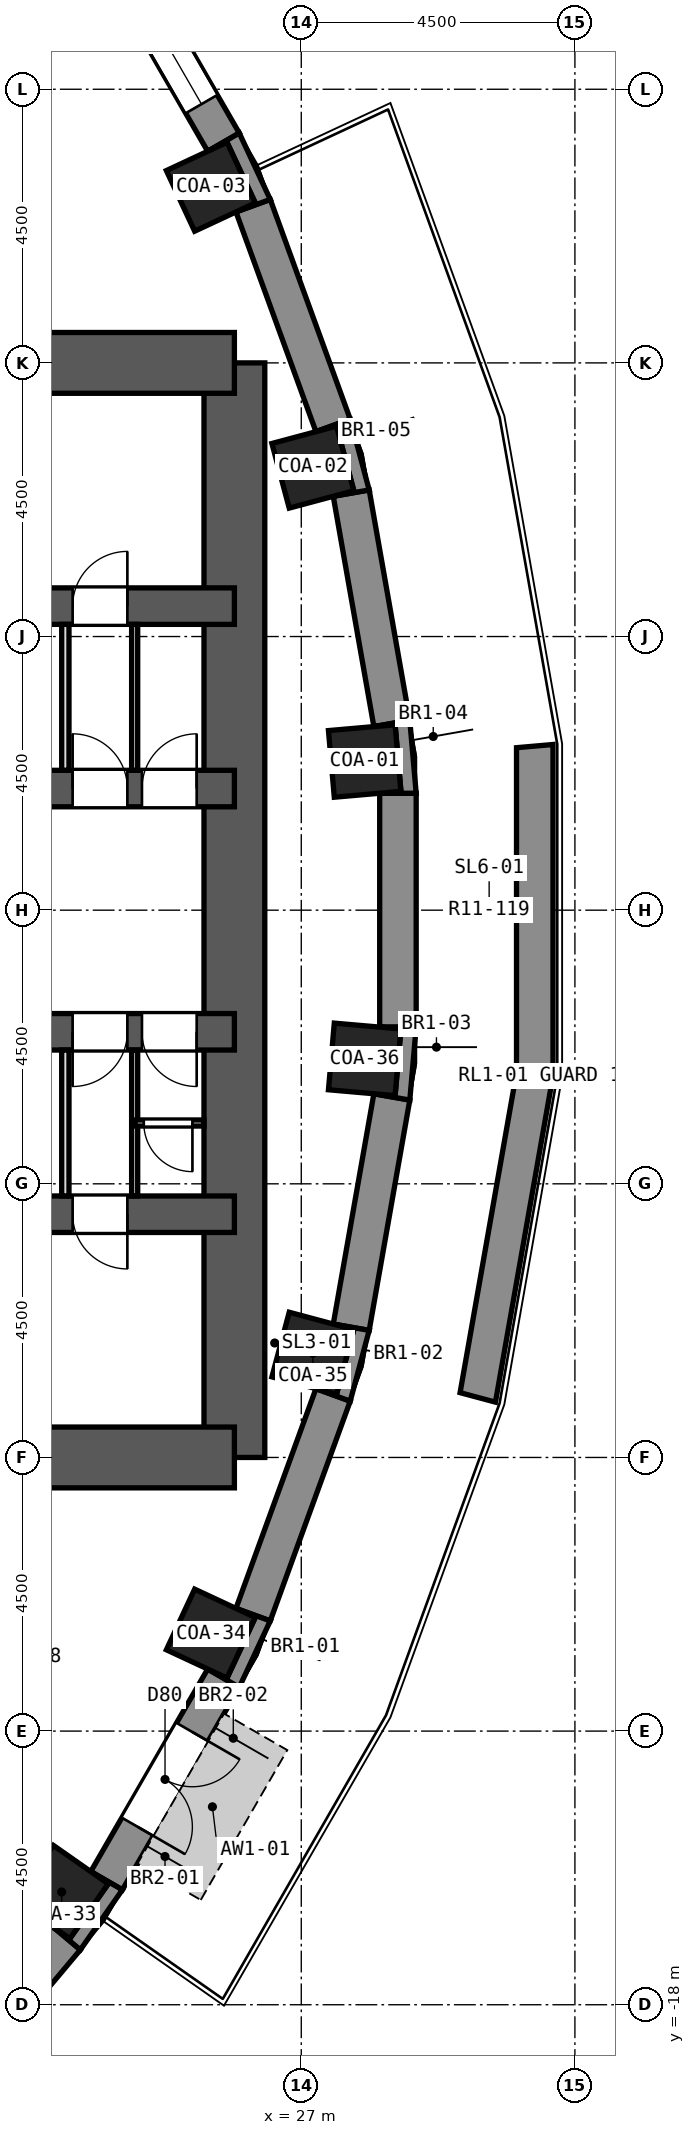
"""IFC4 building model, lengths in metres.
Left out: names, types, materials, properties, quantities, classifications, styles, units other than length and angle.
Written with IfcOpenShell. Run it as: python <this file> out.ifc"""

import sys

from ifc_helpers import new_model, si_unit, direction, frame, frame_2d, origin, origin_2d, place, context, subcontext, project, spatial, polyline, rectangle, outline, extrude, element, fill, save


model = new_model("IFC4")
c1 = context("Model", 3, precision=1e-05, world=origin(), true_north=direction((0.0, 1.0)))
c2 = subcontext(c1, "Body", "Model", "MODEL_VIEW")
j1 = project(units=[si_unit("LENGTHUNIT", "METRE"), si_unit("PLANEANGLEUNIT", "RADIAN")], contexts=[c1])
p1 = place(None, origin())
s1 = spatial("IfcSite", under=j1, at=p1, CompositionType="ELEMENT")
p2 = place(p1, origin())
s2 = spatial("IfcBuilding", under=s1, at=p2, CompositionType="ELEMENT")
p3 = place(p2, frame((0.0, 0.0, 46.1)))
s3 = spatial("IfcBuildingStorey", under=s2, at=p3, CompositionType="ELEMENT", Elevation=46.1)
for number, where, z_axis, x_axis in (
    (1, (28.043, 2.453, 0.0), (0.0, 0.0, 1.0), (0.996, 0.087, 0.0)),
    (2, (27.191, 7.286, 0.0), (0.0, 0.0, 1.0), (0.966, 0.259, 0.0)),
    (3, (25.512, 11.897, 0.0), (0.0, 0.0, 1.0), (0.906, 0.423, 0.0)),
    (4, (23.059, -16.146, 0.0), (0.0, 0.0, 1.0), (0.819, -0.574, 0.0)),
    (5, (25.512, -11.897, 0.0), (0.0, 0.0, 1.0), (0.906, -0.423, 0.0)),
    (6, (27.191, -7.286, 0.0), (0.0, 0.0, 1.0), (0.966, -0.259, 0.0)),
    (7, (28.043, -2.453, 0.0), (0.0, 0.0, 1.0), (0.996, -0.087, 0.0)),
):
    element("IfcColumn", number, at=place(p3, frame(where, z_axis=z_axis, x_axis=x_axis)), inside=s3, PredefinedType="COLUMN", context=c2, shape_type="SweptSolid", body=[
        extrude(rectangle(XDim=1.1, YDim=1.1, at=origin_2d()), origin(), (0.0, 0.0, 1.0), 3.3),
    ])
p4 = place(p3, frame((25.9, -9.0, 0.0), z_axis=(0.0, 0.0, 1.0), x_axis=(0.0, 1.0, 0.0)))
e8 = element("IfcWall", 8, at=p4, inside=s3, PredefinedType="SHEAR", context=c2, shape_type="SweptSolid", body=[
    extrude(rectangle(XDim=18.0, YDim=1.0, at=frame_2d((9.0, 0.0))), origin(), (0.0, 0.0, 1.0), 3.3),
])
for number, where, z_axis, x_axis in (
    (9, (13.5, 9.0, 0.0), (0.0, 0.0, 1.0), (1.0, 0.0, 0.0)),
    (10, (13.5, -9.0, 0.0), (0.0, 0.0, 1.0), (1.0, 0.0, 0.0)),
):
    element("IfcWall", number, at=place(p3, frame(where, z_axis=z_axis, x_axis=x_axis)), inside=s3, PredefinedType="SHEAR", context=c2, shape_type="SweptSolid", body=[
        extrude(rectangle(XDim=12.4, YDim=1.0, at=frame_2d((6.2, 0.0))), origin(), (0.0, 0.0, 1.0), 3.3),
    ])
p5 = place(p3, frame((13.5, 5.0, 0.0), z_axis=(0.0, 0.0, 1.0), x_axis=(1.0, 0.0, 0.0)))
e11 = element("IfcWall", 11, at=p5, inside=s3, PredefinedType="SHEAR", context=c2, shape_type="SweptSolid", body=[
    extrude(rectangle(XDim=12.4, YDim=0.6, at=frame_2d((6.2, 0.0))), origin(), (0.0, 0.0, 1.0), 3.3),
])
p6 = place(p5, frame((6.039, 0.0, 0.0)))
e12 = element("IfcOpeningElement", 12, at=p6, cuts=e11, PredefinedType="OPENING", context=c2, shape_type="SweptSolid", body=[
    extrude(rectangle(XDim=0.9, YDim=2.1, at=frame_2d((0.45, 1.05))), frame((0.0, 0.312, 0.0), z_axis=(0.0, -1.0, 0.0), x_axis=(1.0, 0.0, 0.0)), (0.0, 0.0, 1.0), 0.624),
])
p7 = place(p5, frame((9.74, 0.0, 0.0)))
e13 = element("IfcOpeningElement", 13, at=p7, cuts=e11, PredefinedType="OPENING", context=c2, shape_type="SweptSolid", body=[
    extrude(rectangle(XDim=0.9, YDim=2.1, at=frame_2d((0.45, 1.05))), frame((0.0, 0.312, 0.0), z_axis=(0.0, -1.0, 0.0), x_axis=(1.0, 0.0, 0.0)), (0.0, 0.0, 1.0), 0.624),
])
p8 = place(p3, frame((13.5, -5.0, 0.0), z_axis=(0.0, 0.0, 1.0), x_axis=(1.0, 0.0, 0.0)))
e14 = element("IfcWall", 14, at=p8, inside=s3, PredefinedType="SHEAR", context=c2, shape_type="SweptSolid", body=[
    extrude(rectangle(XDim=12.4, YDim=0.6, at=frame_2d((6.2, 0.0))), origin(), (0.0, 0.0, 1.0), 3.3),
])
p9 = place(p8, frame((9.74, 0.0, 0.0)))
e15 = element("IfcOpeningElement", 15, at=p9, cuts=e14, PredefinedType="OPENING", context=c2, shape_type="SweptSolid", body=[
    extrude(rectangle(XDim=0.9, YDim=2.1, at=frame_2d((0.45, 1.05))), frame((0.0, 0.312, 0.0), z_axis=(0.0, -1.0, 0.0), x_axis=(1.0, 0.0, 0.0)), (0.0, 0.0, 1.0), 0.624),
])
p10 = place(p8, frame((0.6, 0.0, 0.0)))
e16 = element("IfcOpeningElement", 16, at=p10, cuts=e14, PredefinedType="OPENING", context=c2, shape_type="SweptSolid", body=[
    extrude(rectangle(XDim=1.1, YDim=2.1, at=frame_2d((0.55, 1.05))), frame((0.0, 0.312, 0.0), z_axis=(0.0, -1.0, 0.0), x_axis=(1.0, 0.0, 0.0)), (0.0, 0.0, 1.0), 0.624),
])
p11 = place(p3, frame((13.5, 2.0, 0.0), z_axis=(0.0, 0.0, 1.0), x_axis=(1.0, 0.0, 0.0)))
e17 = element("IfcWall", 17, at=p11, inside=s3, PredefinedType="SHEAR", context=c2, shape_type="SweptSolid", body=[
    extrude(rectangle(XDim=12.4, YDim=0.6, at=frame_2d((6.2, 0.0))), origin(), (0.0, 0.0, 1.0), 3.3),
])
p12 = place(p11, frame((7.65, 0.0, 0.0)))
e18 = element("IfcOpeningElement", 18, at=p12, cuts=e17, PredefinedType="OPENING", context=c2, shape_type="SweptSolid", body=[
    extrude(rectangle(XDim=1.1, YDim=2.1, at=frame_2d((0.55, 1.05))), frame((0.0, 0.312, 0.0), z_axis=(0.0, -1.0, 0.0), x_axis=(1.0, 0.0, 0.0)), (0.0, 0.0, 1.0), 0.624),
])
p13 = place(p11, frame((2.341, 0.0, 0.0)))
e19 = element("IfcOpeningElement", 19, at=p13, cuts=e17, PredefinedType="OPENING", context=c2, shape_type="SweptSolid", body=[
    extrude(rectangle(XDim=0.9, YDim=2.1, at=frame_2d((0.45, 1.05))), frame((0.0, 0.312, 0.0), z_axis=(0.0, -1.0, 0.0), x_axis=(1.0, 0.0, 0.0)), (0.0, 0.0, 1.0), 0.624),
])
p14 = place(p11, frame((5.761, 0.0, 0.0)))
e20 = element("IfcOpeningElement", 20, at=p14, cuts=e17, PredefinedType="OPENING", context=c2, shape_type="SweptSolid", body=[
    extrude(rectangle(XDim=0.9, YDim=2.1, at=frame_2d((0.45, 1.05))), frame((0.0, 0.312, 0.0), z_axis=(0.0, -1.0, 0.0), x_axis=(1.0, 0.0, 0.0)), (0.0, 0.0, 1.0), 0.624),
])
p15 = place(p11, frame((9.74, 0.0, 0.0)))
e21 = element("IfcOpeningElement", 21, at=p15, cuts=e17, PredefinedType="OPENING", context=c2, shape_type="SweptSolid", body=[
    extrude(rectangle(XDim=0.9, YDim=2.1, at=frame_2d((0.45, 1.05))), frame((0.0, 0.312, 0.0), z_axis=(0.0, -1.0, 0.0), x_axis=(1.0, 0.0, 0.0)), (0.0, 0.0, 1.0), 0.624),
])
p16 = place(p11, frame((10.88, 0.0, 0.0)))
e22 = element("IfcOpeningElement", 22, at=p16, cuts=e17, PredefinedType="OPENING", context=c2, shape_type="SweptSolid", body=[
    extrude(rectangle(XDim=0.9, YDim=2.1, at=frame_2d((0.45, 1.05))), frame((0.0, 0.312, 0.0), z_axis=(0.0, -1.0, 0.0), x_axis=(1.0, 0.0, 0.0)), (0.0, 0.0, 1.0), 0.624),
])
p17 = place(p3, frame((13.5, -2.0, 0.0), z_axis=(0.0, 0.0, 1.0), x_axis=(1.0, 0.0, 0.0)))
e23 = element("IfcWall", 23, at=p17, inside=s3, PredefinedType="SHEAR", context=c2, shape_type="SweptSolid", body=[
    extrude(rectangle(XDim=12.4, YDim=0.6, at=frame_2d((6.2, 0.0))), origin(), (0.0, 0.0, 1.0), 3.3),
])
p18 = place(p17, frame((5.62, 0.0, 0.0)))
e24 = element("IfcOpeningElement", 24, at=p18, cuts=e23, PredefinedType="OPENING", context=c2, shape_type="SweptSolid", body=[
    extrude(rectangle(XDim=1.1, YDim=2.1, at=frame_2d((0.55, 1.05))), frame((0.0, 0.312, 0.0), z_axis=(0.0, -1.0, 0.0), x_axis=(1.0, 0.0, 0.0)), (0.0, 0.0, 1.0), 0.624),
])
p19 = place(p17, frame((7.65, 0.0, 0.0)))
e25 = element("IfcOpeningElement", 25, at=p19, cuts=e23, PredefinedType="OPENING", context=c2, shape_type="SweptSolid", body=[
    extrude(rectangle(XDim=1.1, YDim=2.1, at=frame_2d((0.55, 1.05))), frame((0.0, 0.312, 0.0), z_axis=(0.0, -1.0, 0.0), x_axis=(1.0, 0.0, 0.0)), (0.0, 0.0, 1.0), 0.624),
])
p20 = place(p17, frame((1.265, 0.0, 0.0)))
e26 = element("IfcOpeningElement", 26, at=p20, cuts=e23, PredefinedType="OPENING", context=c2, shape_type="SweptSolid", body=[
    extrude(rectangle(XDim=1.0, YDim=2.1, at=frame_2d((0.5, 1.05))), frame((0.0, 0.312, 0.0), z_axis=(0.0, -1.0, 0.0), x_axis=(1.0, 0.0, 0.0)), (0.0, 0.0, 1.0), 0.624),
])
p21 = place(p17, frame((9.74, 0.0, 0.0)))
e27 = element("IfcOpeningElement", 27, at=p21, cuts=e23, PredefinedType="OPENING", context=c2, shape_type="SweptSolid", body=[
    extrude(rectangle(XDim=0.9, YDim=2.1, at=frame_2d((0.45, 1.05))), frame((0.0, 0.312, 0.0), z_axis=(0.0, -1.0, 0.0), x_axis=(1.0, 0.0, 0.0)), (0.0, 0.0, 1.0), 0.624),
])
p22 = place(p17, frame((10.88, 0.0, 0.0)))
e28 = element("IfcOpeningElement", 28, at=p22, cuts=e23, PredefinedType="OPENING", context=c2, shape_type="SweptSolid", body=[
    extrude(rectangle(XDim=0.9, YDim=2.1, at=frame_2d((0.45, 1.05))), frame((0.0, 0.312, 0.0), z_axis=(0.0, -1.0, 0.0), x_axis=(1.0, 0.0, 0.0)), (0.0, 0.0, 1.0), 0.624),
])
p23 = place(p3, frame((28.489, 3.071, 0.0), z_axis=(0.0, 0.0, 1.0), x_axis=(-0.173687553279, 0.984800809218, 0.0)))
e29 = element("IfcWall", 29, at=p23, inside=s3, PredefinedType="SOLIDWALL", context=c2, shape_type="SweptSolid", body=[
    extrude(rectangle(XDim=3.846, YDim=0.6, at=frame_2d((1.923, 0.0))), origin(), (0.0, 0.0, 1.0), 2.75),
])
p24 = place(p3, frame((27.523, 7.971, 0.0), z_axis=(0.0, 0.0, 1.0), x_axis=(-0.342028474173, 0.939689588564, 0.0)))
e30 = element("IfcWall", 30, at=p24, inside=s3, PredefinedType="SOLIDWALL", context=c2, shape_type="SweptSolid", body=[
    extrude(rectangle(XDim=3.846, YDim=0.6, at=frame_2d((1.923, 0.0))), origin(), (0.0, 0.0, 1.0), 2.75),
])
p25 = place(p3, frame((25.721, 12.63, 0.0), z_axis=(0.0, 0.0, 1.0), x_axis=(-0.499989888488, 0.86603124159, 0.0)))
e31 = element("IfcWall", 31, at=p25, inside=s3, PredefinedType="SOLIDWALL", context=c2, shape_type="SweptSolid", body=[
    extrude(rectangle(XDim=3.846, YDim=0.6, at=frame_2d((1.923, 0.0))), origin(), (0.0, 0.0, 1.0), 2.75),
])
p26 = place(p25, frame((0.723, 0.0, 0.9)))
e32 = element("IfcOpeningElement", 32, at=p26, cuts=e31, PredefinedType="OPENING", context=c2, shape_type="SweptSolid", body=[
    extrude(rectangle(XDim=2.4, YDim=1.8, at=frame_2d((1.2, 0.9))), frame((0.0, 0.312, 0.0), z_axis=(0.0, -1.0, 0.0), x_axis=(1.0, 0.0, 0.0)), (0.0, 0.0, 1.0), 0.624),
])
p27 = place(p3, frame((20.665, -19.85, 0.0), z_axis=(0.0, 0.0, 1.0), x_axis=(0.642809392687, 0.766026164483, 0.0)))
e33 = element("IfcWall", 33, at=p27, inside=s3, PredefinedType="SOLIDWALL", context=c2, shape_type="SweptSolid", body=[
    extrude(rectangle(XDim=3.846, YDim=0.6, at=frame_2d((1.923, 0.0))), origin(), (0.0, 0.0, 1.0), 2.75),
])
p28 = place(p27, frame((0.723, 0.0, 0.9)))
e34 = element("IfcOpeningElement", 34, at=p28, cuts=e33, PredefinedType="OPENING", context=c2, shape_type="SweptSolid", body=[
    extrude(rectangle(XDim=2.4, YDim=1.8, at=frame_2d((1.2, 0.9))), frame((0.0, 0.312, 0.0), z_axis=(0.0, -1.0, 0.0), x_axis=(1.0, 0.0, 0.0)), (0.0, 0.0, 1.0), 0.624),
])
p29 = place(p3, frame((23.798, -15.96, 0.0), z_axis=(0.0, 0.0, 1.0), x_axis=(0.499989888488, 0.86603124159, 0.0)))
e35 = element("IfcWall", 35, at=p29, inside=s3, PredefinedType="SOLIDWALL", context=c2, shape_type="SweptSolid", body=[
    extrude(rectangle(XDim=3.846, YDim=0.6, at=frame_2d((1.923, 0.0))), origin(), (0.0, 0.0, 1.0), 2.75),
])
p30 = place(p29, frame((1.023, 0.0, 0.0)))
e36 = element("IfcOpeningElement", 36, at=p30, cuts=e35, PredefinedType="OPENING", context=c2, shape_type="SweptSolid", body=[
    extrude(rectangle(XDim=1.8, YDim=2.4, at=frame_2d((0.9, 1.2))), frame((0.0, 0.312, 0.0), z_axis=(0.0, -1.0, 0.0), x_axis=(1.0, 0.0, 0.0)), (0.0, 0.0, 1.0), 0.624),
])
p31 = place(p3, frame((26.208, -11.585, 0.0), z_axis=(0.0, 0.0, 1.0), x_axis=(0.342028474173, 0.939689588564, 0.0)))
e37 = element("IfcWall", 37, at=p31, inside=s3, PredefinedType="SOLIDWALL", context=c2, shape_type="SweptSolid", body=[
    extrude(rectangle(XDim=3.846, YDim=0.6, at=frame_2d((1.923, 0.0))), origin(), (0.0, 0.0, 1.0), 2.75),
])
for number, where, z_axis, x_axis in (
    (38, (27.821, -6.858, 0.0), (0.0, 0.0, 1.0), (0.174, 0.985, 0.0)),
    (39, (28.59, -1.923, 0.0), (0.0, 0.0, 1.0), (0.0, 1.0, 0.0)),
):
    element("IfcWall", number, at=place(p3, frame(where, z_axis=z_axis, x_axis=x_axis)), inside=s3, PredefinedType="SOLIDWALL", context=c2, shape_type="SweptSolid", body=[
        extrude(rectangle(XDim=3.846, YDim=0.6, at=frame_2d((1.923, 0.0))), origin(), (0.0, 0.0, 1.0), 2.75),
    ])
p32 = place(p3, origin())
e40 = element("IfcWall", 40, at=p32, inside=s3, PredefinedType="SOLIDWALL", context=c2, shape_type="SweptSolid", body=[
    extrude(outline(polyline([(28.89, 1.923), (28.785, 3.123), (28.194, 3.019), (28.543, 3.049), (28.639, 1.954), (28.29, 1.923), (28.89, 1.923)])), origin(), (0.0, 0.0, 1.0), 2.75),
])
p33 = place(p3, origin())
e41 = element("IfcWall", 41, at=p33, inside=s3, PredefinedType="SOLIDWALL", context=c2, shape_type="SweptSolid", body=[
    extrude(outline(polyline([(28.117, 6.91), (27.805, 8.074), (27.241, 7.869), (27.58, 7.959), (27.865, 6.897), (27.526, 6.806), (28.117, 6.91)])), origin(), (0.0, 0.0, 1.0), 2.75),
])
p34 = place(p3, origin())
e42 = element("IfcWall", 42, at=p34, inside=s3, PredefinedType="SOLIDWALL", context=c2, shape_type="SweptSolid", body=[
    extrude(outline(polyline([(25.981, 12.78), (25.461, 12.479), (25.779, 12.628), (26.243, 11.631), (25.926, 11.483), (26.49, 11.688), (25.981, 12.78)])), origin(), (0.0, 0.0, 1.0), 2.75),
])
p35 = place(p3, origin())
e43 = element("IfcWall", 43, at=p35, inside=s3, PredefinedType="SOLIDWALL", context=c2, shape_type="SweptSolid", body=[
    extrude(outline(polyline([(23.367, -17.097), (24.058, -16.11), (23.538, -15.81), (23.825, -16.011), (23.194, -16.912), (22.907, -16.711), (23.367, -17.097)])), origin(), (0.0, 0.0, 1.0), 2.75),
])
p36 = place(p3, origin())
e44 = element("IfcWall", 44, at=p36, inside=s3, PredefinedType="SOLIDWALL", context=c2, shape_type="SweptSolid", body=[
    extrude(outline(polyline([(26.49, -11.688), (25.926, -11.483), (26.243, -11.631), (25.779, -12.628), (25.461, -12.479), (25.981, -12.78), (26.49, -11.688)])), origin(), (0.0, 0.0, 1.0), 2.75),
])
p37 = place(p3, origin())
e45 = element("IfcWall", 45, at=p37, inside=s3, PredefinedType="SOLIDWALL", context=c2, shape_type="SweptSolid", body=[
    extrude(outline(polyline([(28.117, -6.91), (27.526, -6.806), (27.865, -6.897), (27.58, -7.959), (27.241, -7.869), (27.805, -8.074), (28.117, -6.91)])), origin(), (0.0, 0.0, 1.0), 2.75),
])
p38 = place(p3, origin())
e46 = element("IfcWall", 46, at=p38, inside=s3, PredefinedType="SOLIDWALL", context=c2, shape_type="SweptSolid", body=[
    extrude(outline(polyline([(28.785, -3.123), (28.89, -1.923), (28.29, -1.923), (28.639, -1.954), (28.543, -3.049), (28.194, -3.019), (28.785, -3.123)])), origin(), (0.0, 0.0, 1.0), 2.75),
])
p39 = place(p3, origin())
e47 = element("IfcWall", 47, at=p39, inside=s3, PredefinedType="PARAPET", context=c2, shape_type="SweptSolid", body=[
    extrude(outline(polyline([(30.194, -8.09), (31.14, -2.724), (31.14, 2.724), (30.54, 2.672), (30.54, -2.672), (29.612, -7.934), (30.194, -8.09)])), origin(), (0.0, 0.0, 1.0), 0.5),
])
p40 = place(p3, frame((23.12, 2.3, 0.0), z_axis=(0.0, 0.0, 1.0), x_axis=(0.0, 1.0, 0.0)))
e48 = element("IfcWall", 48, at=p40, inside=s3, PredefinedType="PARTITIONING", context=c2, shape_type="SweptSolid", body=[
    extrude(rectangle(XDim=2.4, YDim=0.12, at=frame_2d((1.2, 0.0))), origin(), (0.0, 0.0, 1.0), 2.75),
])
p41 = place(p3, frame((24.26, 2.3, 0.0), z_axis=(0.0, 0.0, 1.0), x_axis=(0.0, 1.0, 0.0)))
e49 = element("IfcWall", 49, at=p41, inside=s3, PredefinedType="PARTITIONING", context=c2, shape_type="SweptSolid", body=[
    extrude(rectangle(XDim=2.4, YDim=0.1, at=frame_2d((1.2, 0.0))), origin(), (0.0, 0.0, 1.0), 2.75),
])
p42 = place(p3, frame((23.12, -4.7, 0.0), z_axis=(0.0, 0.0, 1.0), x_axis=(0.0, 1.0, 0.0)))
e50 = element("IfcWall", 50, at=p42, inside=s3, PredefinedType="PARTITIONING", context=c2, shape_type="SweptSolid", body=[
    extrude(rectangle(XDim=2.4, YDim=0.12, at=frame_2d((1.2, 0.0))), origin(), (0.0, 0.0, 1.0), 2.75),
])
p43 = place(p3, frame((24.26, -4.7, 0.0), z_axis=(0.0, 0.0, 1.0), x_axis=(0.0, 1.0, 0.0)))
e51 = element("IfcWall", 51, at=p43, inside=s3, PredefinedType="PARTITIONING", context=c2, shape_type="SweptSolid", body=[
    extrude(rectangle(XDim=2.4, YDim=0.1, at=frame_2d((1.2, 0.0))), origin(), (0.0, 0.0, 1.0), 2.75),
])
p44 = place(p3, frame((24.26, -3.5, 0.0), z_axis=(0.0, 0.0, 1.0), x_axis=(1.0, 0.0, 0.0)))
e52 = element("IfcWall", 52, at=p44, inside=s3, PredefinedType="PARTITIONING", context=c2, shape_type="SweptSolid", body=[
    extrude(rectangle(XDim=1.14, YDim=0.1, at=frame_2d((0.57, 0.0))), origin(), (0.0, 0.0, 1.0), 2.75),
])
p45 = place(p44, frame((0.15, 0.0, 0.0)))
e53 = element("IfcOpeningElement", 53, at=p45, cuts=e52, PredefinedType="OPENING", context=c2, shape_type="SweptSolid", body=[
    extrude(rectangle(XDim=0.8, YDim=2.1, at=frame_2d((0.4, 1.05))), frame((0.0, 0.062, 0.0), z_axis=(0.0, -1.0, 0.0), x_axis=(1.0, 0.0, 0.0)), (0.0, 0.0, 1.0), 0.124),
])
p46 = place(p26, origin())
e54 = element("IfcWindow", 54, at=p46, inside=s3, PartitioningType="SINGLE_PANEL", PredefinedType="WINDOW", context=c2, shape_type="SweptSolid", body=[
    extrude(rectangle(XDim=2.4, YDim=1.8, at=frame_2d((1.2, 0.9))), frame((0.0, 0.18, 0.0), z_axis=(0.0, -1.0, 0.0), x_axis=(1.0, 0.0, 0.0)), (0.0, 0.0, 1.0), 0.06),
])
fill(e32, e54)
p47 = place(p30, frame((1.8, 0.0, 0.0), z_axis=(0.0, 0.0, 1.0), x_axis=(-1.0, 0.0, 0.0)))
e55 = element("IfcDoor", 55, at=p47, inside=s3, OperationType="DOUBLE_DOOR_SINGLE_SWING", PredefinedType="DOOR", context=c2, shape_type="SweptSolid", body=[
    extrude(rectangle(XDim=1.8, YDim=2.4, at=frame_2d((0.9, 1.2))), frame((0.0, -0.075, 0.0), z_axis=(0.0, -1.0, 0.0), x_axis=(1.0, 0.0, 0.0)), (0.0, 0.0, 1.0), 0.05),
])
fill(e36, e55)
p48 = place(p15, origin())
e56 = element("IfcDoor", 56, at=p48, inside=s3, OperationType="SINGLE_SWING_LEFT", PredefinedType="DOOR", context=c2, shape_type="SweptSolid", body=[
    extrude(rectangle(XDim=0.9, YDim=2.1, at=frame_2d((0.45, 1.05))), frame((0.0, 0.025, 0.0), z_axis=(0.0, -1.0, 0.0), x_axis=(1.0, 0.0, 0.0)), (0.0, 0.0, 1.0), 0.05),
])
fill(e21, e56)
p49 = place(p16, origin())
e57 = element("IfcDoor", 57, at=p49, inside=s3, OperationType="SINGLE_SWING_RIGHT", PredefinedType="DOOR", context=c2, shape_type="SweptSolid", body=[
    extrude(rectangle(XDim=0.9, YDim=2.1, at=frame_2d((0.45, 1.05))), frame((0.0, 0.025, 0.0), z_axis=(0.0, -1.0, 0.0), x_axis=(1.0, 0.0, 0.0)), (0.0, 0.0, 1.0), 0.05),
])
fill(e22, e57)
p50 = place(p21, frame((0.9, 0.0, 0.0), z_axis=(0.0, 0.0, 1.0), x_axis=(-1.0, 0.0, 0.0)))
e58 = element("IfcDoor", 58, at=p50, inside=s3, OperationType="SINGLE_SWING_RIGHT", PredefinedType="DOOR", context=c2, shape_type="SweptSolid", body=[
    extrude(rectangle(XDim=0.9, YDim=2.1, at=frame_2d((0.45, 1.05))), frame((0.0, 0.025, 0.0), z_axis=(0.0, -1.0, 0.0), x_axis=(1.0, 0.0, 0.0)), (0.0, 0.0, 1.0), 0.05),
])
fill(e27, e58)
p51 = place(p22, frame((0.9, 0.0, 0.0), z_axis=(0.0, 0.0, 1.0), x_axis=(-1.0, 0.0, 0.0)))
e59 = element("IfcDoor", 59, at=p51, inside=s3, OperationType="SINGLE_SWING_LEFT", PredefinedType="DOOR", context=c2, shape_type="SweptSolid", body=[
    extrude(rectangle(XDim=0.9, YDim=2.1, at=frame_2d((0.45, 1.05))), frame((0.0, 0.025, 0.0), z_axis=(0.0, -1.0, 0.0), x_axis=(1.0, 0.0, 0.0)), (0.0, 0.0, 1.0), 0.05),
])
fill(e28, e59)
p52 = place(p7, origin())
e60 = element("IfcDoor", 60, at=p52, inside=s3, OperationType="SINGLE_SWING_RIGHT", PredefinedType="DOOR", context=c2, shape_type="SweptSolid", body=[
    extrude(rectangle(XDim=0.9, YDim=2.1, at=frame_2d((0.45, 1.05))), frame((0.0, 0.025, 0.0), z_axis=(0.0, -1.0, 0.0), x_axis=(1.0, 0.0, 0.0)), (0.0, 0.0, 1.0), 0.05),
])
fill(e13, e60)
p53 = place(p45, frame((0.8, 0.0, 0.0), z_axis=(0.0, 0.0, 1.0), x_axis=(-1.0, 0.0, 0.0)))
e61 = element("IfcDoor", 61, at=p53, inside=s3, OperationType="SINGLE_SWING_LEFT", PredefinedType="DOOR", context=c2, shape_type="SweptSolid", body=[
    extrude(rectangle(XDim=0.8, YDim=2.1, at=frame_2d((0.4, 1.05))), frame((0.0, 0.025, 0.0), z_axis=(0.0, -1.0, 0.0), x_axis=(1.0, 0.0, 0.0)), (0.0, 0.0, 1.0), 0.05),
])
fill(e53, e61)
p54 = place(p9, frame((0.9, 0.0, 0.0), z_axis=(0.0, 0.0, 1.0), x_axis=(-1.0, 0.0, 0.0)))
e62 = element("IfcDoor", 62, at=p54, inside=s3, OperationType="SINGLE_SWING_LEFT", PredefinedType="DOOR", context=c2, shape_type="SweptSolid", body=[
    extrude(rectangle(XDim=0.9, YDim=2.1, at=frame_2d((0.45, 1.05))), frame((0.0, 0.025, 0.0), z_axis=(0.0, -1.0, 0.0), x_axis=(1.0, 0.0, 0.0)), (0.0, 0.0, 1.0), 0.05),
])
fill(e15, e62)
save(model, sys.argv[1])
